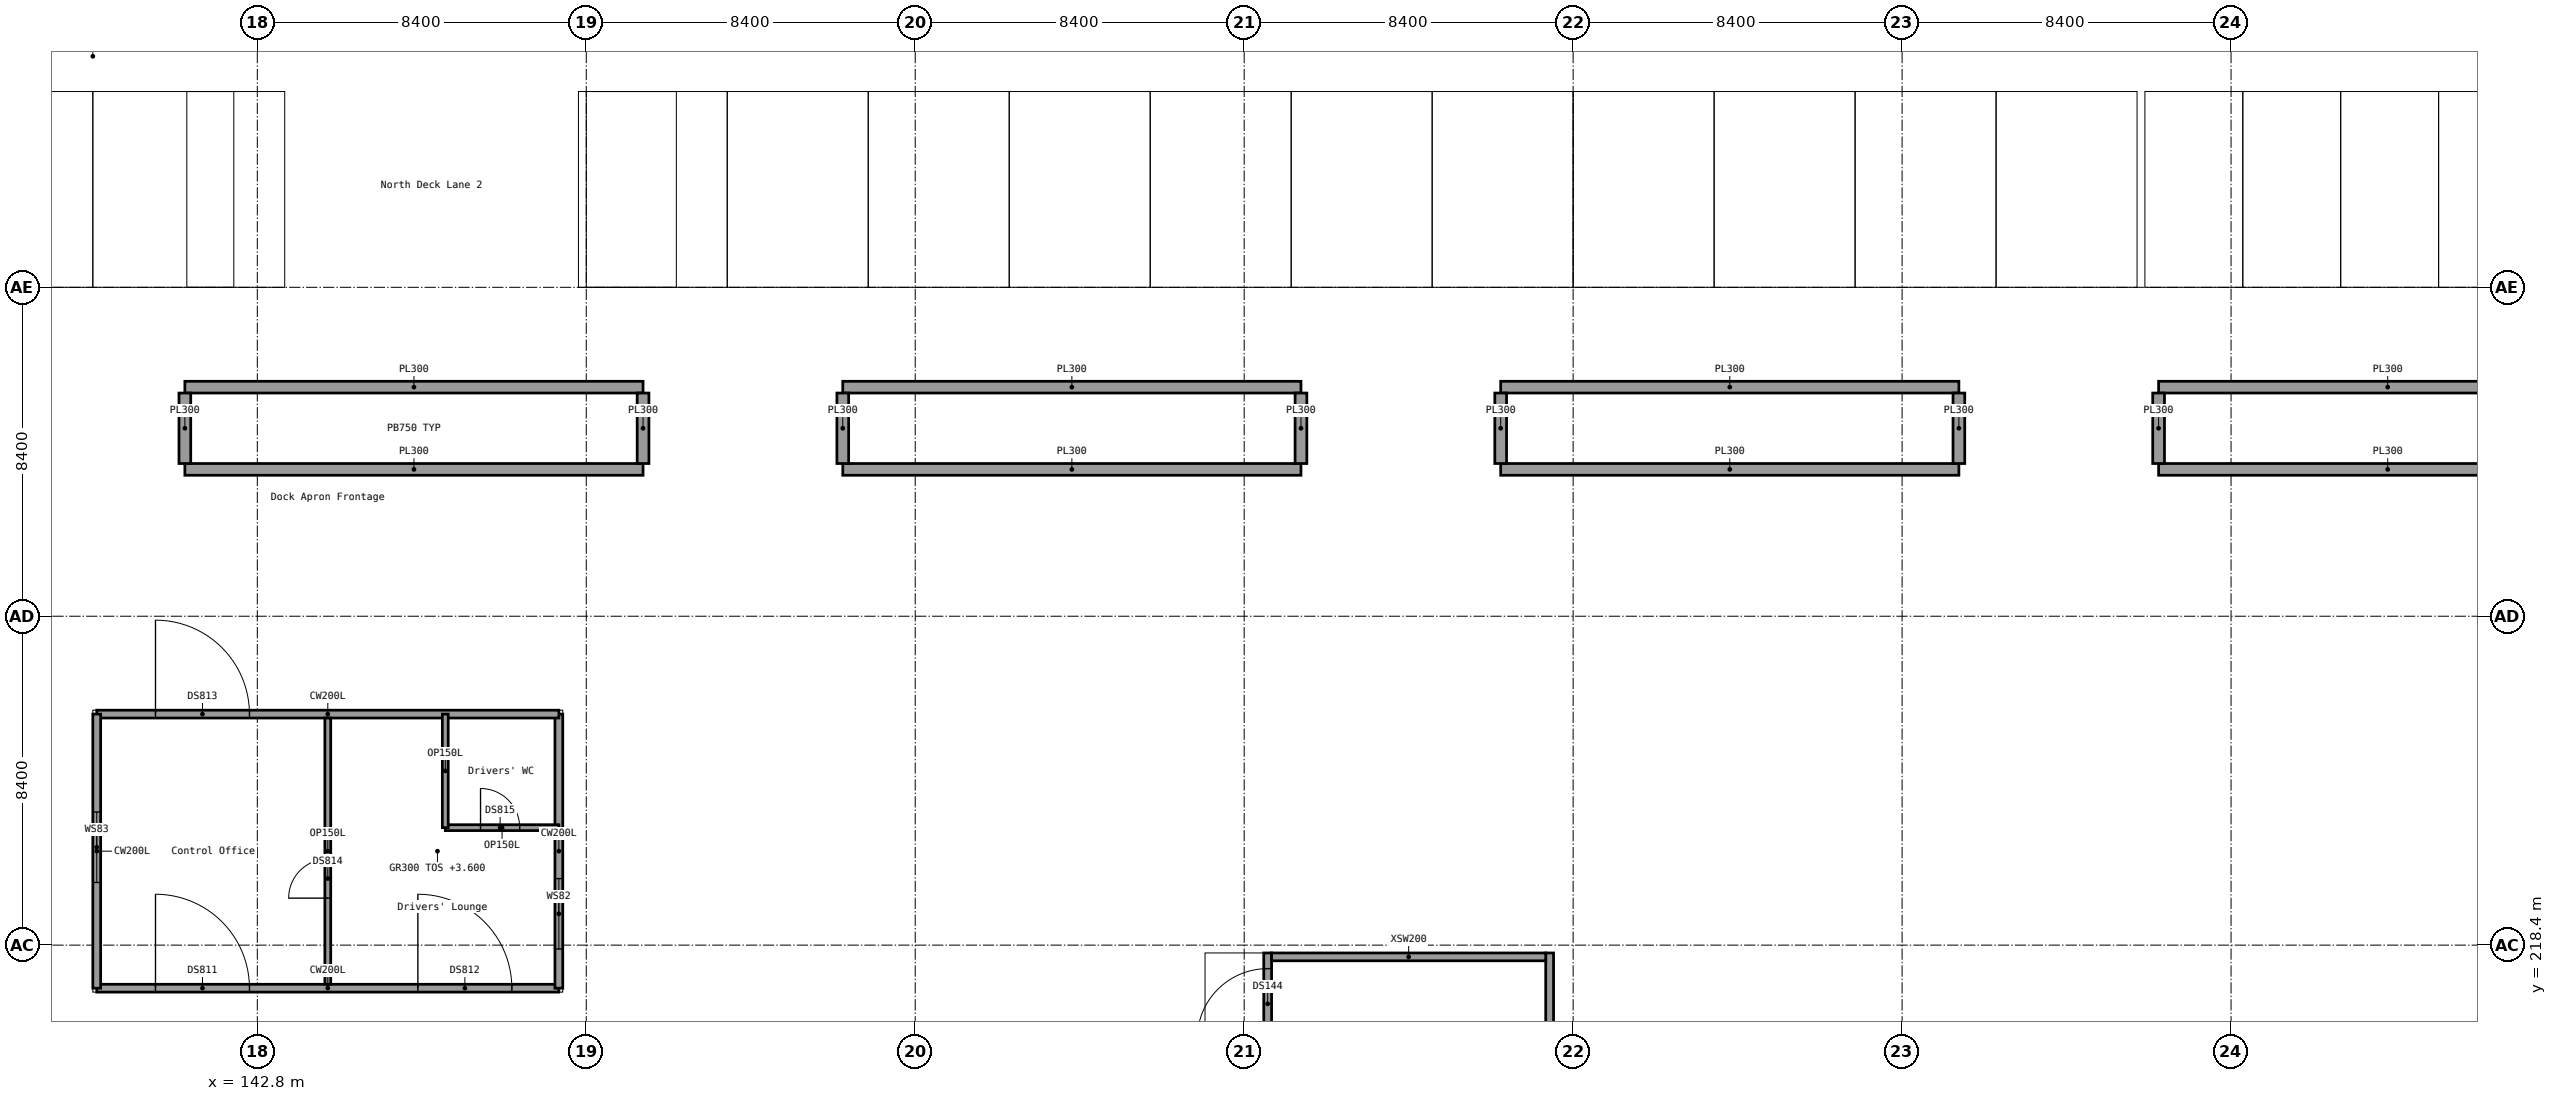
"""IFC4 building model, lengths in metres.
Left out: names, types, materials, properties, quantities, classifications, styles, units other than length and angle.
Written with IfcOpenShell. Run it as: python <this file> out.ifc"""

import sys

from ifc_helpers import new_model, si_unit, direction, frame, frame_2d, origin, place, context, subcontext, project, spatial, rectangle, extrude, element, fill, save


model = new_model("IFC4")
c1 = context("Model", 3, precision=1e-05, world=origin(), true_north=direction((0.0, 1.0)))
c2 = subcontext(c1, "Body", "Model", "MODEL_VIEW")
j1 = project(units=[si_unit("LENGTHUNIT", "METRE"), si_unit("PLANEANGLEUNIT", "RADIAN")], contexts=[c1])
p1 = place(None, origin())
s1 = spatial("IfcSite", under=j1, at=p1, CompositionType="ELEMENT")
p2 = place(p1, origin())
s2 = spatial("IfcBuilding", under=s1, at=p2, CompositionType="ELEMENT")
p3 = place(p2, origin())
s3 = spatial("IfcBuildingStorey", under=s2, at=p3, CompositionType="ELEMENT", Elevation=0.0)
p4 = place(p3, frame((168.6, 213.4, 0.0), z_axis=(0.0, 0.0, 1.0), x_axis=(0.0, 1.0, 0.0)))
e1 = element("IfcWall", 1, at=p4, inside=s3, PredefinedType="SOLIDWALL", context=c2, shape_type="SweptSolid", body=[
    extrude(rectangle(XDim=4.8, YDim=0.2, at=frame_2d((2.4, 0.0))), origin(), (0.0, 0.0, 1.0), 3.2),
])
p5 = place(p4, frame((2.6, 0.0, 0.0)))
e2 = element("IfcOpeningElement", 2, at=p5, cuts=e1, PredefinedType="OPENING", context=c2, shape_type="SweptSolid", body=[
    extrude(rectangle(XDim=1.8, YDim=2.1, at=frame_2d((0.9, 1.05))), frame((0.0, 0.1, 0.0), z_axis=(0.0, -1.0, 0.0), x_axis=(1.0, 0.0, 0.0)), (0.0, 0.0, 1.0), 0.2),
])
p6 = place(p3, frame((175.8, 213.4, 0.0), z_axis=(0.0, 0.0, 1.0), x_axis=(0.0, 1.0, 0.0)))
e3 = element("IfcWall", 3, at=p6, inside=s3, PredefinedType="SOLIDWALL", context=c2, shape_type="SweptSolid", body=[
    extrude(rectangle(XDim=4.8, YDim=0.2, at=frame_2d((2.4, 0.0))), origin(), (0.0, 0.0, 1.0), 3.2),
])
p7 = place(p3, frame((168.7, 218.1, 0.0), z_axis=(0.0, 0.0, 1.0), x_axis=(1.0, 0.0, 0.0)))
e4 = element("IfcWall", 4, at=p7, inside=s3, PredefinedType="SOLIDWALL", context=c2, shape_type="SweptSolid", body=[
    extrude(rectangle(XDim=7.0, YDim=0.2, at=frame_2d((3.5, 0.0))), origin(), (0.0, 0.0, 1.0), 3.2),
])
for number, where, z_axis, x_axis in (
    (5, (140.95, 230.55, 0.0), (0.0, 0.0, 1.0), (1.0, 0.0, 0.0)),
    (6, (140.95, 232.65, 0.0), (0.0, 0.0, 1.0), (1.0, 0.0, 0.0)),
):
    element("IfcWall", number, at=place(p3, frame(where, z_axis=z_axis, x_axis=x_axis)), inside=s3, PredefinedType="SOLIDWALL", context=c2, shape_type="SweptSolid", body=[
        extrude(rectangle(XDim=11.7, YDim=0.3, at=frame_2d((5.85, 0.0))), origin(), (0.0, 0.0, 1.0), 0.9),
    ])
for number, where, z_axis, x_axis in (
    (7, (140.95, 230.7, 0.0), (0.0, 0.0, 1.0), (0.0, 1.0, 0.0)),
    (8, (152.65, 230.7, 0.0), (0.0, 0.0, 1.0), (0.0, 1.0, 0.0)),
):
    element("IfcWall", number, at=place(p3, frame(where, z_axis=z_axis, x_axis=x_axis)), inside=s3, PredefinedType="SOLIDWALL", context=c2, shape_type="SweptSolid", body=[
        extrude(rectangle(XDim=1.8, YDim=0.3, at=frame_2d((0.9, 0.0))), origin(), (0.0, 0.0, 1.0), 0.9),
    ])
for number, where, z_axis, x_axis in (
    (9, (157.75, 230.55, 0.0), (0.0, 0.0, 1.0), (1.0, 0.0, 0.0)),
    (10, (157.75, 232.65, 0.0), (0.0, 0.0, 1.0), (1.0, 0.0, 0.0)),
):
    element("IfcWall", number, at=place(p3, frame(where, z_axis=z_axis, x_axis=x_axis)), inside=s3, PredefinedType="SOLIDWALL", context=c2, shape_type="SweptSolid", body=[
        extrude(rectangle(XDim=11.7, YDim=0.3, at=frame_2d((5.85, 0.0))), origin(), (0.0, 0.0, 1.0), 0.9),
    ])
for number, where, z_axis, x_axis in (
    (11, (157.75, 230.7, 0.0), (0.0, 0.0, 1.0), (0.0, 1.0, 0.0)),
    (12, (169.45, 230.7, 0.0), (0.0, 0.0, 1.0), (0.0, 1.0, 0.0)),
):
    element("IfcWall", number, at=place(p3, frame(where, z_axis=z_axis, x_axis=x_axis)), inside=s3, PredefinedType="SOLIDWALL", context=c2, shape_type="SweptSolid", body=[
        extrude(rectangle(XDim=1.8, YDim=0.3, at=frame_2d((0.9, 0.0))), origin(), (0.0, 0.0, 1.0), 0.9),
    ])
for number, where, z_axis, x_axis in (
    (13, (174.55, 230.55, 0.0), (0.0, 0.0, 1.0), (1.0, 0.0, 0.0)),
    (14, (174.55, 232.65, 0.0), (0.0, 0.0, 1.0), (1.0, 0.0, 0.0)),
):
    element("IfcWall", number, at=place(p3, frame(where, z_axis=z_axis, x_axis=x_axis)), inside=s3, PredefinedType="SOLIDWALL", context=c2, shape_type="SweptSolid", body=[
        extrude(rectangle(XDim=11.7, YDim=0.3, at=frame_2d((5.85, 0.0))), origin(), (0.0, 0.0, 1.0), 0.9),
    ])
for number, where, z_axis, x_axis in (
    (15, (174.55, 230.7, 0.0), (0.0, 0.0, 1.0), (0.0, 1.0, 0.0)),
    (16, (186.25, 230.7, 0.0), (0.0, 0.0, 1.0), (0.0, 1.0, 0.0)),
):
    element("IfcWall", number, at=place(p3, frame(where, z_axis=z_axis, x_axis=x_axis)), inside=s3, PredefinedType="SOLIDWALL", context=c2, shape_type="SweptSolid", body=[
        extrude(rectangle(XDim=1.8, YDim=0.3, at=frame_2d((0.9, 0.0))), origin(), (0.0, 0.0, 1.0), 0.9),
    ])
for number, where, z_axis, x_axis in (
    (17, (191.35, 230.55, 0.0), (0.0, 0.0, 1.0), (1.0, 0.0, 0.0)),
    (18, (191.35, 232.65, 0.0), (0.0, 0.0, 1.0), (1.0, 0.0, 0.0)),
):
    element("IfcWall", number, at=place(p3, frame(where, z_axis=z_axis, x_axis=x_axis)), inside=s3, PredefinedType="SOLIDWALL", context=c2, shape_type="SweptSolid", body=[
        extrude(rectangle(XDim=11.7, YDim=0.3, at=frame_2d((5.85, 0.0))), origin(), (0.0, 0.0, 1.0), 0.9),
    ])
p8 = place(p3, frame((191.35, 230.7, 0.0), z_axis=(0.0, 0.0, 1.0), x_axis=(0.0, 1.0, 0.0)))
e19 = element("IfcWall", 19, at=p8, inside=s3, PredefinedType="SOLIDWALL", context=c2, shape_type="SweptSolid", body=[
    extrude(rectangle(XDim=1.8, YDim=0.3, at=frame_2d((0.9, 0.0))), origin(), (0.0, 0.0, 1.0), 0.9),
])
p9 = place(p3, frame((138.7, 217.3, 0.0), z_axis=(0.0, 0.0, 1.0), x_axis=(1.0, 0.0, 0.0)))
e20 = element("IfcWall", 20, at=p9, inside=s3, PredefinedType="SOLIDWALL", context=c2, shape_type="SweptSolid", body=[
    extrude(rectangle(XDim=11.8, YDim=0.2, at=frame_2d((5.9, 0.0))), origin(), (0.0, 0.0, 1.0), 3.3),
])
p10 = place(p9, frame((1.5, 0.0, 0.0)))
e21 = element("IfcOpeningElement", 21, at=p10, cuts=e20, PredefinedType="OPENING", context=c2, shape_type="SweptSolid", body=[
    extrude(rectangle(XDim=2.4, YDim=2.4, at=frame_2d((1.2, 1.2))), frame((0.0, 0.1, 0.0), z_axis=(0.0, -1.0, 0.0), x_axis=(1.0, 0.0, 0.0)), (0.0, 0.0, 1.0), 0.2),
])
p11 = place(p9, frame((8.2, 0.0, 0.0)))
e22 = element("IfcOpeningElement", 22, at=p11, cuts=e20, PredefinedType="OPENING", context=c2, shape_type="SweptSolid", body=[
    extrude(rectangle(XDim=2.4, YDim=2.4, at=frame_2d((1.2, 1.2))), frame((0.0, 0.1, 0.0), z_axis=(0.0, -1.0, 0.0), x_axis=(1.0, 0.0, 0.0)), (0.0, 0.0, 1.0), 0.2),
])
p12 = place(p3, frame((150.5, 217.3, 0.0), z_axis=(0.0, 0.0, 1.0), x_axis=(0.0, 1.0, 0.0)))
e23 = element("IfcWall", 23, at=p12, inside=s3, PredefinedType="SOLIDWALL", context=c2, shape_type="SweptSolid", body=[
    extrude(rectangle(XDim=7.0, YDim=0.2, at=frame_2d((3.5, 0.0))), origin(), (0.0, 0.0, 1.0), 3.3),
])
p13 = place(p12, frame((1.0, 0.0, 0.9)))
e24 = element("IfcOpeningElement", 24, at=p13, cuts=e23, PredefinedType="OPENING", context=c2, shape_type="SweptSolid", body=[
    extrude(rectangle(XDim=1.8, YDim=1.2, at=frame_2d((0.9, 0.6))), frame((0.0, 0.1, 0.0), z_axis=(0.0, -1.0, 0.0), x_axis=(1.0, 0.0, 0.0)), (0.0, 0.0, 1.0), 0.2),
])
p14 = place(p3, frame((138.7, 224.3, 0.0), z_axis=(0.0, 0.0, 1.0), x_axis=(1.0, 0.0, 0.0)))
e25 = element("IfcWall", 25, at=p14, inside=s3, PredefinedType="SOLIDWALL", context=c2, shape_type="SweptSolid", body=[
    extrude(rectangle(XDim=11.8, YDim=0.2, at=frame_2d((5.9, 0.0))), origin(), (0.0, 0.0, 1.0), 3.3),
])
p15 = place(p14, frame((1.5, 0.0, 0.0)))
e26 = element("IfcOpeningElement", 26, at=p15, cuts=e25, PredefinedType="OPENING", context=c2, shape_type="SweptSolid", body=[
    extrude(rectangle(XDim=2.4, YDim=2.4, at=frame_2d((1.2, 1.2))), frame((0.0, 0.1, 0.0), z_axis=(0.0, -1.0, 0.0), x_axis=(1.0, 0.0, 0.0)), (0.0, 0.0, 1.0), 0.2),
])
p16 = place(p3, frame((138.7, 217.3, 0.0), z_axis=(0.0, 0.0, 1.0), x_axis=(0.0, 1.0, 0.0)))
e27 = element("IfcWall", 27, at=p16, inside=s3, PredefinedType="SOLIDWALL", context=c2, shape_type="SweptSolid", body=[
    extrude(rectangle(XDim=7.0, YDim=0.2, at=frame_2d((3.5, 0.0))), origin(), (0.0, 0.0, 1.0), 3.3),
])
p17 = place(p16, frame((2.7, 0.0, 0.9)))
e28 = element("IfcOpeningElement", 28, at=p17, cuts=e27, PredefinedType="OPENING", context=c2, shape_type="SweptSolid", body=[
    extrude(rectangle(XDim=1.8, YDim=1.2, at=frame_2d((0.9, 0.6))), frame((0.0, 0.1, 0.0), z_axis=(0.0, -1.0, 0.0), x_axis=(1.0, 0.0, 0.0)), (0.0, 0.0, 1.0), 0.2),
])
p18 = place(p3, frame((144.6, 217.4, 0.0), z_axis=(0.0, 0.0, 1.0), x_axis=(0.0, 1.0, 0.0)))
e29 = element("IfcWall", 29, at=p18, inside=s3, PredefinedType="PARTITIONING", context=c2, shape_type="SweptSolid", body=[
    extrude(rectangle(XDim=6.8, YDim=0.15, at=frame_2d((3.4, 0.0))), origin(), (0.0, 0.0, 1.0), 3.3),
])
p19 = place(p18, frame((2.2, 0.0, 0.0)))
e30 = element("IfcOpeningElement", 30, at=p19, cuts=e29, PredefinedType="OPENING", context=c2, shape_type="SweptSolid", body=[
    extrude(rectangle(XDim=1.0, YDim=2.1, at=frame_2d((0.5, 1.05))), frame((0.0, 0.075, 0.0), z_axis=(0.0, -1.0, 0.0), x_axis=(1.0, 0.0, 0.0)), (0.0, 0.0, 1.0), 0.15),
])
p20 = place(p3, frame((147.6, 221.4, 0.0), z_axis=(0.0, 0.0, 1.0), x_axis=(1.0, 0.0, 0.0)))
e31 = element("IfcWall", 31, at=p20, inside=s3, PredefinedType="PARTITIONING", context=c2, shape_type="SweptSolid", body=[
    extrude(rectangle(XDim=2.9, YDim=0.15, at=frame_2d((1.45, 0.0))), origin(), (0.0, 0.0, 1.0), 3.3),
])
p21 = place(p20, frame((0.9, 0.0, 0.0)))
e32 = element("IfcOpeningElement", 32, at=p21, cuts=e31, PredefinedType="OPENING", context=c2, shape_type="SweptSolid", body=[
    extrude(rectangle(XDim=1.0, YDim=2.1, at=frame_2d((0.5, 1.05))), frame((0.0, 0.075, 0.0), z_axis=(0.0, -1.0, 0.0), x_axis=(1.0, 0.0, 0.0)), (0.0, 0.0, 1.0), 0.15),
])
p22 = place(p3, frame((147.6, 221.4, 0.0), z_axis=(0.0, 0.0, 1.0), x_axis=(0.0, 1.0, 0.0)))
e33 = element("IfcWall", 33, at=p22, inside=s3, PredefinedType="PARTITIONING", context=c2, shape_type="SweptSolid", body=[
    extrude(rectangle(XDim=2.9, YDim=0.15, at=frame_2d((1.45, 0.0))), origin(), (0.0, 0.0, 1.0), 3.3),
])
p23 = place(p5, origin())
e34 = element("IfcDoor", 34, at=p23, inside=s3, OperationType="SINGLE_SWING_LEFT", PredefinedType="DOOR", context=c2, shape_type="SweptSolid", body=[
    extrude(rectangle(XDim=1.8, YDim=2.1, at=frame_2d((0.9, 1.05))), frame((0.0, 0.025, 0.0), z_axis=(0.0, -1.0, 0.0), x_axis=(1.0, 0.0, 0.0)), (0.0, 0.0, 1.0), 0.05),
])
fill(e2, e34)
p24 = place(p10, origin())
e35 = element("IfcDoor", 35, at=p24, inside=s3, OperationType="DOUBLE_DOOR_SINGLE_SWING", PredefinedType="DOOR", context=c2, shape_type="SweptSolid", body=[
    extrude(rectangle(XDim=2.4, YDim=2.4, at=frame_2d((1.2, 1.2))), frame((0.0, 0.025, 0.0), z_axis=(0.0, -1.0, 0.0), x_axis=(1.0, 0.0, 0.0)), (0.0, 0.0, 1.0), 0.05),
])
fill(e21, e35)
p25 = place(p11, origin())
e36 = element("IfcDoor", 36, at=p25, inside=s3, OperationType="DOUBLE_DOOR_SINGLE_SWING", PredefinedType="DOOR", context=c2, shape_type="SweptSolid", body=[
    extrude(rectangle(XDim=2.4, YDim=2.4, at=frame_2d((1.2, 1.2))), frame((0.0, 0.025, 0.0), z_axis=(0.0, -1.0, 0.0), x_axis=(1.0, 0.0, 0.0)), (0.0, 0.0, 1.0), 0.05),
])
fill(e22, e36)
p26 = place(p15, origin())
e37 = element("IfcDoor", 37, at=p26, inside=s3, OperationType="DOUBLE_DOOR_SINGLE_SWING", PredefinedType="DOOR", context=c2, shape_type="SweptSolid", body=[
    extrude(rectangle(XDim=2.4, YDim=2.4, at=frame_2d((1.2, 1.2))), frame((0.0, 0.025, 0.0), z_axis=(0.0, -1.0, 0.0), x_axis=(1.0, 0.0, 0.0)), (0.0, 0.0, 1.0), 0.05),
])
fill(e26, e37)
p27 = place(p19, origin())
e38 = element("IfcDoor", 38, at=p27, inside=s3, OperationType="SINGLE_SWING_LEFT", PredefinedType="DOOR", context=c2, shape_type="SweptSolid", body=[
    extrude(rectangle(XDim=1.0, YDim=2.1, at=frame_2d((0.5, 1.05))), frame((0.0, 0.025, 0.0), z_axis=(0.0, -1.0, 0.0), x_axis=(1.0, 0.0, 0.0)), (0.0, 0.0, 1.0), 0.05),
])
fill(e30, e38)
p28 = place(p21, origin())
e39 = element("IfcDoor", 39, at=p28, inside=s3, OperationType="SINGLE_SWING_LEFT", PredefinedType="DOOR", context=c2, shape_type="SweptSolid", body=[
    extrude(rectangle(XDim=1.0, YDim=2.1, at=frame_2d((0.5, 1.05))), frame((0.0, 0.025, 0.0), z_axis=(0.0, -1.0, 0.0), x_axis=(1.0, 0.0, 0.0)), (0.0, 0.0, 1.0), 0.05),
])
fill(e32, e39)
p29 = place(p13, origin())
e40 = element("IfcWindow", 40, at=p29, inside=s3, PartitioningType="SINGLE_PANEL", PredefinedType="WINDOW", context=c2, shape_type="SweptSolid", body=[
    extrude(rectangle(XDim=1.8, YDim=1.2, at=frame_2d((0.9, 0.6))), frame((0.0, 0.03, 0.0), z_axis=(0.0, -1.0, 0.0), x_axis=(1.0, 0.0, 0.0)), (0.0, 0.0, 1.0), 0.06),
])
fill(e24, e40)
p30 = place(p17, origin())
e41 = element("IfcWindow", 41, at=p30, inside=s3, PartitioningType="SINGLE_PANEL", PredefinedType="WINDOW", context=c2, shape_type="SweptSolid", body=[
    extrude(rectangle(XDim=1.8, YDim=1.2, at=frame_2d((0.9, 0.6))), frame((0.0, 0.03, 0.0), z_axis=(0.0, -1.0, 0.0), x_axis=(1.0, 0.0, 0.0)), (0.0, 0.0, 1.0), 0.06),
])
fill(e28, e41)
save(model, sys.argv[1])
